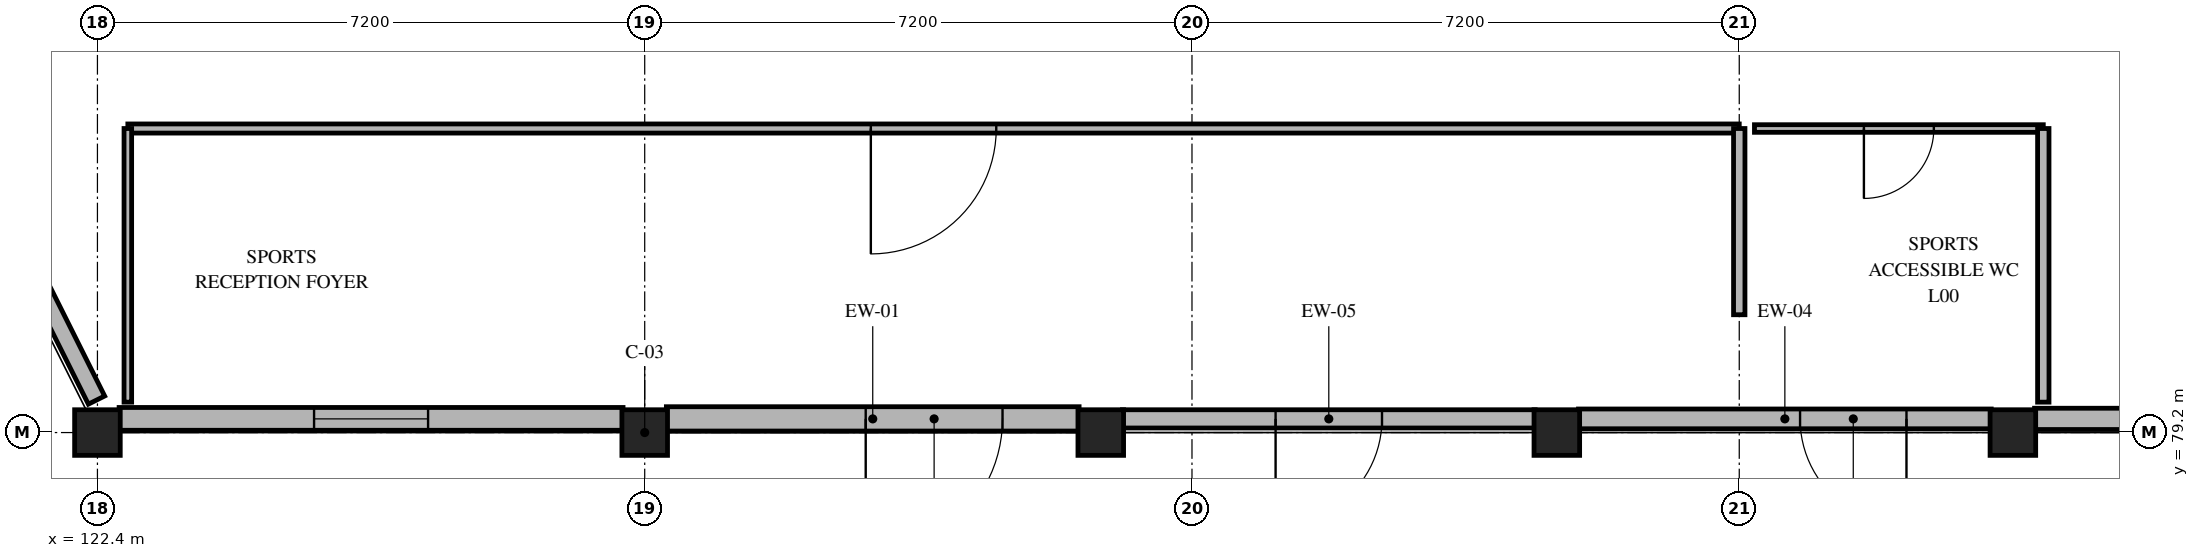
"""IFC4 building model, lengths in metres.
Left out: names, types, materials, properties, quantities, classifications, styles, units other than length and angle.
Written with IfcOpenShell. Run it as: python <this file> out.ifc"""

import sys

from ifc_helpers import new_model, si_unit, direction, frame, frame_2d, origin, origin_2d, place, context, subcontext, project, spatial, rectangle, extrude, element, fill, save


model = new_model("IFC4")
c1 = context("Model", 3, precision=1e-05, world=origin(), true_north=direction((0.0, 1.0)))
c2 = subcontext(c1, "Body", "Model", "MODEL_VIEW")
j1 = project(units=[si_unit("LENGTHUNIT", "METRE"), si_unit("PLANEANGLEUNIT", "RADIAN")], contexts=[c1])
p1 = place(None, origin())
s1 = spatial("IfcSite", under=j1, at=p1, CompositionType="ELEMENT")
p2 = place(p1, origin())
s2 = spatial("IfcBuilding", under=s1, at=p2, CompositionType="ELEMENT")
p3 = place(p2, origin())
s3 = spatial("IfcBuildingStorey", under=s2, at=p3, CompositionType="ELEMENT", Elevation=0.0)
for number, where, z_axis, x_axis in (
    (1, (129.6, 79.2, 0.0), (0.0, 0.0, 1.0), (1.0, 0.0, 0.0)),
    (2, (135.6, 79.2, 0.0), (0.0, 0.0, 1.0), (1.0, 0.0, 0.0)),
    (3, (141.6, 79.2, 0.0), (0.0, 0.0, 1.0), (1.0, 0.0, 0.0)),
    (4, (147.6, 79.2, 0.0), (0.0, 0.0, 1.0), (1.0, 0.0, 0.0)),
    (5, (122.4, 79.2, 0.0), (0.0, 0.0, 1.0), (1.0, 0.0, 0.0)),
):
    element("IfcColumn", number, at=place(p3, frame(where, z_axis=z_axis, x_axis=x_axis)), inside=s3, PredefinedType="COLUMN", context=c2, shape_type="SweptSolid", body=[
        extrude(rectangle(XDim=0.6, YDim=0.6, at=origin_2d()), origin(), (0.0, 0.0, 1.0), 4.5),
    ])
p4 = place(p3, frame((153.315, 79.38, 0.0), z_axis=(0.0, 0.0, 1.0), x_axis=(-1.0, 0.0, 0.0)))
e6 = element("IfcWall", 6, at=p4, inside=s3, PredefinedType="SOLIDWALL", context=c2, shape_type="SweptSolid", body=[
    extrude(rectangle(XDim=5.43, YDim=0.28, at=frame_2d((2.715, 0.0))), origin(), (0.0, 0.0, 1.0), 3.88),
])
p5 = place(p4, frame((0.958, 0.0, 0.0)))
e7 = element("IfcOpeningElement", 7, at=p5, cuts=e6, PredefinedType="OPENING", context=c2, shape_type="SweptSolid", body=[
    extrude(rectangle(XDim=2.0, YDim=2.4, at=frame_2d((1.0, 1.2))), frame((0.0, 0.15, 0.0), z_axis=(0.0, -1.0, 0.0), x_axis=(1.0, 0.0, 0.0)), (0.0, 0.0, 1.0), 0.3),
])
p6 = place(p3, frame((147.315, 79.38, 0.0), z_axis=(0.0, 0.0, 1.0), x_axis=(-1.0, 0.0, 0.0)))
e8 = element("IfcWall", 8, at=p6, inside=s3, PredefinedType="SOLIDWALL", context=c2, shape_type="SweptSolid", body=[
    extrude(rectangle(XDim=5.43, YDim=0.26, at=frame_2d((2.715, 0.0))), origin(), (0.0, 0.0, 1.0), 3.88),
])
p7 = place(p6, frame((1.115, 0.0, 0.0)))
e9 = element("IfcOpeningElement", 9, at=p7, cuts=e8, PredefinedType="OPENING", context=c2, shape_type="SweptSolid", body=[
    extrude(rectangle(XDim=1.4, YDim=2.2, at=frame_2d((0.7, 1.1))), frame((0.0, 0.14, 0.0), z_axis=(0.0, -1.0, 0.0), x_axis=(1.0, 0.0, 0.0)), (0.0, 0.0, 1.0), 0.28),
])
p8 = place(p3, frame((141.315, 79.38, 0.0), z_axis=(0.0, 0.0, 1.0), x_axis=(-1.0, 0.0, 0.0)))
e10 = element("IfcWall", 10, at=p8, inside=s3, PredefinedType="SOLIDWALL", context=c2, shape_type="SweptSolid", body=[
    extrude(rectangle(XDim=5.43, YDim=0.24, at=frame_2d((2.715, 0.0))), origin(), (0.0, 0.0, 1.0), 3.88),
])
p9 = place(p8, frame((2.015, 0.0, 0.0)))
e11 = element("IfcOpeningElement", 11, at=p9, cuts=e10, PredefinedType="OPENING", context=c2, shape_type="SweptSolid", body=[
    extrude(rectangle(XDim=1.4, YDim=2.2, at=frame_2d((0.7, 1.1))), frame((0.0, 0.13, 0.0), z_axis=(0.0, -1.0, 0.0), x_axis=(1.0, 0.0, 0.0)), (0.0, 0.0, 1.0), 0.26),
])
p10 = place(p3, frame((135.315, 79.38, 0.0), z_axis=(0.0, 0.0, 1.0), x_axis=(-1.0, 0.0, 0.0)))
e12 = element("IfcWall", 12, at=p10, inside=s3, PredefinedType="SOLIDWALL", context=c2, shape_type="SweptSolid", body=[
    extrude(rectangle(XDim=5.43, YDim=0.32, at=frame_2d((2.715, 0.0))), origin(), (0.0, 0.0, 1.0), 3.88),
])
p11 = place(p10, frame((1.008, 0.0, 0.0)))
e13 = element("IfcOpeningElement", 13, at=p11, cuts=e12, PredefinedType="OPENING", context=c2, shape_type="SweptSolid", body=[
    extrude(rectangle(XDim=1.8, YDim=2.4, at=frame_2d((0.9, 1.2))), frame((0.0, 0.17, 0.0), z_axis=(0.0, -1.0, 0.0), x_axis=(1.0, 0.0, 0.0)), (0.0, 0.0, 1.0), 0.34),
])
p12 = place(p3, frame((129.315, 79.38, 0.0), z_axis=(0.0, 0.0, 1.0), x_axis=(-1.0, 0.0, 0.0)))
e14 = element("IfcWall", 14, at=p12, inside=s3, PredefinedType="SOLIDWALL", context=c2, shape_type="SweptSolid", body=[
    extrude(rectangle(XDim=6.63, YDim=0.3, at=frame_2d((3.315, 0.0))), origin(), (0.0, 0.0, 1.0), 3.79),
])
p13 = place(p12, frame((2.565, 0.0, 0.9)))
e15 = element("IfcOpeningElement", 15, at=p13, cuts=e14, PredefinedType="OPENING", context=c2, shape_type="SweptSolid", body=[
    extrude(rectangle(XDim=1.5, YDim=1.2, at=frame_2d((0.75, 0.6))), frame((0.0, 0.16, 0.0), z_axis=(0.0, -1.0, 0.0), x_axis=(1.0, 0.0, 0.0)), (0.0, 0.0, 1.0), 0.32),
])
p14 = place(p3, frame((122.388, 79.627, 0.0), z_axis=(0.0, 0.0, 1.0), x_axis=(-0.4472135955, 0.894427191, 0.0)))
e16 = element("IfcWall", 16, at=p14, inside=s3, PredefinedType="SOLIDWALL", context=c2, shape_type="SweptSolid", body=[
    extrude(rectangle(XDim=15.526, YDim=0.24, at=frame_2d((7.763, 0.0))), origin(), (0.0, 0.0, 1.0), 3.79),
])
p15 = place(p14, frame((7.163, 0.0, 0.9)))
e17 = element("IfcOpeningElement", 17, at=p15, cuts=e16, PredefinedType="OPENING", context=c2, shape_type="SweptSolid", body=[
    extrude(rectangle(XDim=1.2, YDim=1.35, at=frame_2d((0.6, 0.675))), frame((0.0, 0.13, 0.0), z_axis=(0.0, -1.0, 0.0), x_axis=(1.0, 0.0, 0.0)), (0.0, 0.0, 1.0), 0.26),
])
p16 = place(p3, frame((144.0, 83.2, 0.0), z_axis=(0.0, 0.0, 1.0), x_axis=(-1.0, 0.0, 0.0)))
e18 = element("IfcWall", 18, at=p16, inside=s3, PredefinedType="PARTITIONING", context=c2, shape_type="SweptSolid", body=[
    extrude(rectangle(XDim=21.2, YDim=0.12, at=frame_2d((10.6, 0.0))), origin(), (0.0, 0.0, 1.0), 3.84),
])
p17 = place(p16, frame((9.775, 0.0, 0.0)))
e19 = element("IfcOpeningElement", 19, at=p17, cuts=e18, PredefinedType="OPENING", context=c2, shape_type="SweptSolid", body=[
    extrude(rectangle(XDim=1.65, YDim=2.3, at=frame_2d((0.825, 1.15))), frame((0.0, 0.07, 0.0), z_axis=(0.0, -1.0, 0.0), x_axis=(1.0, 0.0, 0.0)), (0.0, 0.0, 1.0), 0.14),
])
p18 = place(p3, frame((122.8, 83.2, 0.0), z_axis=(0.0, 0.0, 1.0), x_axis=(0.0, -1.0, 0.0)))
e20 = element("IfcWall", 20, at=p18, inside=s3, PredefinedType="PARTITIONING", context=c2, shape_type="SweptSolid", body=[
    extrude(rectangle(XDim=3.6, YDim=0.1, at=frame_2d((1.8, 0.0))), origin(), (0.0, 0.0, 1.0), 4.24),
])
p19 = place(p3, frame((144.0, 80.75, 0.0), z_axis=(0.0, 0.0, 1.0), x_axis=(0.0, 1.0, 0.0)))
e21 = element("IfcWall", 21, at=p19, inside=s3, PredefinedType="PARTITIONING", context=c2, shape_type="SweptSolid", body=[
    extrude(rectangle(XDim=2.45, YDim=0.15, at=frame_2d((1.225, 0.0))), origin(), (0.0, 0.0, 1.0), 4.0),
])
p20 = place(p3, frame((148.0, 83.2, 0.0), z_axis=(0.0, 0.0, 1.0), x_axis=(-1.0, 0.0, 0.0)))
e22 = element("IfcWall", 22, at=p20, inside=s3, PredefinedType="PARTITIONING", context=c2, shape_type="SweptSolid", body=[
    extrude(rectangle(XDim=3.8, YDim=0.1, at=frame_2d((1.9, 0.0))), origin(), (0.0, 0.0, 1.0), 3.84),
])
p21 = place(p20, frame((1.44, 0.0, 0.0)))
e23 = element("IfcOpeningElement", 23, at=p21, cuts=e22, PredefinedType="OPENING", context=c2, shape_type="SweptSolid", body=[
    extrude(rectangle(XDim=0.92, YDim=2.1, at=frame_2d((0.46, 1.05))), frame((0.0, 0.06, 0.0), z_axis=(0.0, -1.0, 0.0), x_axis=(1.0, 0.0, 0.0)), (0.0, 0.0, 1.0), 0.12),
])
p22 = place(p3, frame((148.0, 79.6, 0.0), z_axis=(0.0, 0.0, 1.0), x_axis=(0.0, 1.0, 0.0)))
e24 = element("IfcWall", 24, at=p22, inside=s3, PredefinedType="PARTITIONING", context=c2, shape_type="SweptSolid", body=[
    extrude(rectangle(XDim=3.6, YDim=0.15, at=frame_2d((1.8, 0.0))), origin(), (0.0, 0.0, 1.0), 3.91),
])
p23 = place(p7, origin())
e25 = element("IfcDoor", 25, at=p23, inside=s3, OperationType="SINGLE_SWING_LEFT", PredefinedType="DOOR", context=c2, shape_type="SweptSolid", body=[
    extrude(rectangle(XDim=1.4, YDim=2.2, at=frame_2d((0.7, 1.1))), frame((0.0, 0.025, 0.0), z_axis=(0.0, -1.0, 0.0), x_axis=(1.0, 0.0, 0.0)), (0.0, 0.0, 1.0), 0.05),
])
fill(e9, e25)
p24 = place(p9, origin())
e26 = element("IfcDoor", 26, at=p24, inside=s3, OperationType="SINGLE_SWING_RIGHT", PredefinedType="DOOR", context=c2, shape_type="SweptSolid", body=[
    extrude(rectangle(XDim=1.4, YDim=2.2, at=frame_2d((0.7, 1.1))), frame((0.0, 0.025, 0.0), z_axis=(0.0, -1.0, 0.0), x_axis=(1.0, 0.0, 0.0)), (0.0, 0.0, 1.0), 0.05),
])
fill(e11, e26)
p25 = place(p11, origin())
e27 = element("IfcDoor", 27, at=p25, inside=s3, OperationType="SINGLE_SWING_RIGHT", PredefinedType="DOOR", context=c2, shape_type="SweptSolid", body=[
    extrude(rectangle(XDim=1.8, YDim=2.4, at=frame_2d((0.9, 1.2))), frame((0.0, 0.025, 0.0), z_axis=(0.0, -1.0, 0.0), x_axis=(1.0, 0.0, 0.0)), (0.0, 0.0, 1.0), 0.05),
])
fill(e13, e27)
p26 = place(p13, origin())
e28 = element("IfcWindow", 28, at=p26, inside=s3, PartitioningType="SINGLE_PANEL", PredefinedType="WINDOW", context=c2, shape_type="SweptSolid", body=[
    extrude(rectangle(XDim=1.5, YDim=1.2, at=frame_2d((0.75, 0.6))), frame((0.0, 0.03, 0.0), z_axis=(0.0, -1.0, 0.0), x_axis=(1.0, 0.0, 0.0)), (0.0, 0.0, 1.0), 0.06),
])
fill(e15, e28)
p27 = place(p17, origin())
e29 = element("IfcDoor", 29, at=p27, inside=s3, OperationType="SINGLE_SWING_RIGHT", PredefinedType="DOOR", context=c2, shape_type="SweptSolid", body=[
    extrude(rectangle(XDim=1.65, YDim=2.3, at=frame_2d((0.825, 1.15))), frame((0.0, 0.025, 0.0), z_axis=(0.0, -1.0, 0.0), x_axis=(1.0, 0.0, 0.0)), (0.0, 0.0, 1.0), 0.05),
])
fill(e19, e29)
p28 = place(p21, origin())
e30 = element("IfcDoor", 30, at=p28, inside=s3, OperationType="SINGLE_SWING_RIGHT", PredefinedType="DOOR", context=c2, shape_type="SweptSolid", body=[
    extrude(rectangle(XDim=0.92, YDim=2.1, at=frame_2d((0.46, 1.05))), frame((0.0, 0.025, 0.0), z_axis=(0.0, -1.0, 0.0), x_axis=(1.0, 0.0, 0.0)), (0.0, 0.0, 1.0), 0.05),
])
fill(e23, e30)
save(model, sys.argv[1])
